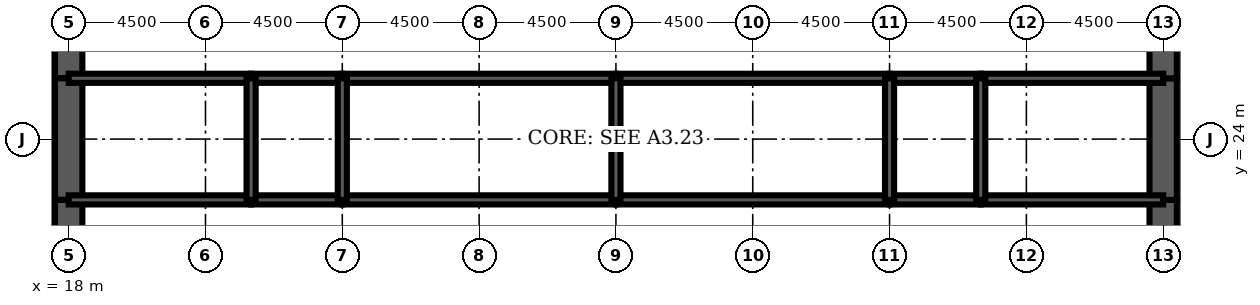
"""IFC4 building model, lengths in metres.
Left out: names, types, materials, properties, quantities, classifications, styles, units other than length and angle.
Written with IfcOpenShell. Run it as: python <this file> out.ifc"""

import sys

from ifc_helpers import new_model, si_unit, direction, frame, frame_2d, origin, place, context, subcontext, project, spatial, rectangle, extrude, element, fill, save


model = new_model("IFC4")
c1 = context("Model", 3, precision=1e-05, world=origin(), true_north=direction((0.0, 1.0)))
c2 = subcontext(c1, "Body", "Model", "MODEL_VIEW")
j1 = project(units=[si_unit("LENGTHUNIT", "METRE"), si_unit("PLANEANGLEUNIT", "RADIAN")], contexts=[c1])
p1 = place(None, origin())
s1 = spatial("IfcSite", under=j1, at=p1, CompositionType="ELEMENT")
p2 = place(p1, origin())
s2 = spatial("IfcBuilding", under=s1, at=p2, CompositionType="ELEMENT")
p3 = place(p2, frame((0.0, 0.0, 100.5)))
s3 = spatial("IfcBuildingStorey", under=s2, at=p3, CompositionType="ELEMENT", Elevation=100.5)
p4 = place(p3, frame((18.0, 28.8, 0.0), z_axis=(0.0, 0.0, 1.0), x_axis=(0.0, -1.0, 0.0)))
e1 = element("IfcWall", 1, at=p4, inside=s3, PredefinedType="SHEAR", context=c2, shape_type="SweptSolid", body=[
    extrude(rectangle(XDim=2.8, YDim=0.9, at=frame_2d((1.4, 0.0))), origin(), (0.0, 0.0, 1.0), 4.2),
])
p5 = place(p4, frame((0.4, 0.0, 0.0)))
e2 = element("IfcOpeningElement", 2, at=p5, cuts=e1, PredefinedType="OPENING", context=c2, shape_type="SweptSolid", body=[
    extrude(rectangle(XDim=1.8, YDim=2.1, at=frame_2d((0.9, 1.05))), frame((0.0, 0.46, 0.0), z_axis=(0.0, -1.0, 0.0), x_axis=(1.0, 0.0, 0.0)), (0.0, 0.0, 1.0), 0.92),
])
p6 = place(p3, frame((18.0, 26.0, 0.0), z_axis=(0.0, 0.0, 1.0), x_axis=(0.0, -1.0, 0.0)))
e3 = element("IfcWall", 3, at=p6, inside=s3, PredefinedType="SHEAR", context=c2, shape_type="SweptSolid", body=[
    extrude(rectangle(XDim=4.0, YDim=0.9, at=frame_2d((2.0, 0.0))), origin(), (0.0, 0.0, 1.0), 4.2),
])
p7 = place(p3, frame((18.0, 22.0, 0.0), z_axis=(0.0, 0.0, 1.0), x_axis=(0.0, -1.0, 0.0)))
e4 = element("IfcWall", 4, at=p7, inside=s3, PredefinedType="SHEAR", context=c2, shape_type="SweptSolid", body=[
    extrude(rectangle(XDim=2.8, YDim=0.9, at=frame_2d((1.4, 0.0))), origin(), (0.0, 0.0, 1.0), 4.2),
])
p8 = place(p7, frame((0.6, 0.0, 0.0)))
e5 = element("IfcOpeningElement", 5, at=p8, cuts=e4, PredefinedType="OPENING", context=c2, shape_type="SweptSolid", body=[
    extrude(rectangle(XDim=1.8, YDim=2.1, at=frame_2d((0.9, 1.05))), frame((0.0, 0.46, 0.0), z_axis=(0.0, -1.0, 0.0), x_axis=(1.0, 0.0, 0.0)), (0.0, 0.0, 1.0), 0.92),
])
p9 = place(p3, frame((54.0, 19.2, 0.0), z_axis=(0.0, 0.0, 1.0), x_axis=(0.0, 1.0, 0.0)))
e6 = element("IfcWall", 6, at=p9, inside=s3, PredefinedType="SHEAR", context=c2, shape_type="SweptSolid", body=[
    extrude(rectangle(XDim=2.8, YDim=0.9, at=frame_2d((1.4, 0.0))), origin(), (0.0, 0.0, 1.0), 4.2),
])
p10 = place(p9, frame((0.4, 0.0, 0.0)))
e7 = element("IfcOpeningElement", 7, at=p10, cuts=e6, PredefinedType="OPENING", context=c2, shape_type="SweptSolid", body=[
    extrude(rectangle(XDim=1.8, YDim=2.1, at=frame_2d((0.9, 1.05))), frame((0.0, 0.46, 0.0), z_axis=(0.0, -1.0, 0.0), x_axis=(1.0, 0.0, 0.0)), (0.0, 0.0, 1.0), 0.92),
])
p11 = place(p3, frame((54.0, 22.0, 0.0), z_axis=(0.0, 0.0, 1.0), x_axis=(0.0, 1.0, 0.0)))
e8 = element("IfcWall", 8, at=p11, inside=s3, PredefinedType="SHEAR", context=c2, shape_type="SweptSolid", body=[
    extrude(rectangle(XDim=4.0, YDim=0.9, at=frame_2d((2.0, 0.0))), origin(), (0.0, 0.0, 1.0), 4.2),
])
p12 = place(p3, frame((54.0, 26.0, 0.0), z_axis=(0.0, 0.0, 1.0), x_axis=(0.0, 1.0, 0.0)))
e9 = element("IfcWall", 9, at=p12, inside=s3, PredefinedType="SHEAR", context=c2, shape_type="SweptSolid", body=[
    extrude(rectangle(XDim=2.8, YDim=0.9, at=frame_2d((1.4, 0.0))), origin(), (0.0, 0.0, 1.0), 4.2),
])
p13 = place(p12, frame((0.6, 0.0, 0.0)))
e10 = element("IfcOpeningElement", 10, at=p13, cuts=e9, PredefinedType="OPENING", context=c2, shape_type="SweptSolid", body=[
    extrude(rectangle(XDim=1.8, YDim=2.1, at=frame_2d((0.9, 1.05))), frame((0.0, 0.46, 0.0), z_axis=(0.0, -1.0, 0.0), x_axis=(1.0, 0.0, 0.0)), (0.0, 0.0, 1.0), 0.92),
])
p14 = place(p3, frame((18.0, 22.0, 0.0), z_axis=(0.0, 0.0, 1.0), x_axis=(1.0, 0.0, 0.0)))
e11 = element("IfcWall", 11, at=p14, inside=s3, PredefinedType="SOLIDWALL", context=c2, shape_type="SweptSolid", body=[
    extrude(rectangle(XDim=6.0, YDim=0.3, at=frame_2d((3.0, 0.0))), origin(), (0.0, 0.0, 1.0), 4.2),
])
p15 = place(p14, frame((2.0, 0.0, 0.0)))
e12 = element("IfcOpeningElement", 12, at=p15, cuts=e11, PredefinedType="OPENING", context=c2, shape_type="SweptSolid", body=[
    extrude(rectangle(XDim=1.0, YDim=2.1, at=frame_2d((0.5, 1.05))), frame((0.0, 0.16, 0.0), z_axis=(0.0, -1.0, 0.0), x_axis=(1.0, 0.0, 0.0)), (0.0, 0.0, 1.0), 0.32),
])
p16 = place(p3, frame((24.0, 22.0, 0.0), z_axis=(0.0, 0.0, 1.0), x_axis=(1.0, 0.0, 0.0)))
e13 = element("IfcWall", 13, at=p16, inside=s3, PredefinedType="SOLIDWALL", context=c2, shape_type="SweptSolid", body=[
    extrude(rectangle(XDim=3.0, YDim=0.3, at=frame_2d((1.5, 0.0))), origin(), (0.0, 0.0, 1.0), 4.2),
])
p17 = place(p16, frame((1.0, 0.0, 0.0)))
e14 = element("IfcOpeningElement", 14, at=p17, cuts=e13, PredefinedType="OPENING", context=c2, shape_type="SweptSolid", body=[
    extrude(rectangle(XDim=1.0, YDim=2.1, at=frame_2d((0.5, 1.05))), frame((0.0, 0.16, 0.0), z_axis=(0.0, -1.0, 0.0), x_axis=(1.0, 0.0, 0.0)), (0.0, 0.0, 1.0), 0.32),
])
p18 = place(p3, frame((27.0, 22.0, 0.0), z_axis=(0.0, 0.0, 1.0), x_axis=(1.0, 0.0, 0.0)))
e15 = element("IfcWall", 15, at=p18, inside=s3, PredefinedType="SOLIDWALL", context=c2, shape_type="SweptSolid", body=[
    extrude(rectangle(XDim=9.0, YDim=0.3, at=frame_2d((4.5, 0.0))), origin(), (0.0, 0.0, 1.0), 4.2),
])
p19 = place(p18, frame((4.0, 0.0, 0.0)))
e16 = element("IfcOpeningElement", 16, at=p19, cuts=e15, PredefinedType="OPENING", context=c2, shape_type="SweptSolid", body=[
    extrude(rectangle(XDim=1.0, YDim=2.1, at=frame_2d((0.5, 1.05))), frame((0.0, 0.16, 0.0), z_axis=(0.0, -1.0, 0.0), x_axis=(1.0, 0.0, 0.0)), (0.0, 0.0, 1.0), 0.32),
])
p20 = place(p3, frame((36.0, 22.0, 0.0), z_axis=(0.0, 0.0, 1.0), x_axis=(1.0, 0.0, 0.0)))
e17 = element("IfcWall", 17, at=p20, inside=s3, PredefinedType="SOLIDWALL", context=c2, shape_type="SweptSolid", body=[
    extrude(rectangle(XDim=9.0, YDim=0.3, at=frame_2d((4.5, 0.0))), origin(), (0.0, 0.0, 1.0), 4.2),
])
p21 = place(p20, frame((4.0, 0.0, 0.0)))
e18 = element("IfcOpeningElement", 18, at=p21, cuts=e17, PredefinedType="OPENING", context=c2, shape_type="SweptSolid", body=[
    extrude(rectangle(XDim=1.0, YDim=2.1, at=frame_2d((0.5, 1.05))), frame((0.0, 0.16, 0.0), z_axis=(0.0, -1.0, 0.0), x_axis=(1.0, 0.0, 0.0)), (0.0, 0.0, 1.0), 0.32),
])
p22 = place(p3, frame((45.0, 22.0, 0.0), z_axis=(0.0, 0.0, 1.0), x_axis=(1.0, 0.0, 0.0)))
e19 = element("IfcWall", 19, at=p22, inside=s3, PredefinedType="SOLIDWALL", context=c2, shape_type="SweptSolid", body=[
    extrude(rectangle(XDim=3.0, YDim=0.3, at=frame_2d((1.5, 0.0))), origin(), (0.0, 0.0, 1.0), 4.2),
])
p23 = place(p22, frame((1.0, 0.0, 0.0)))
e20 = element("IfcOpeningElement", 20, at=p23, cuts=e19, PredefinedType="OPENING", context=c2, shape_type="SweptSolid", body=[
    extrude(rectangle(XDim=1.0, YDim=2.1, at=frame_2d((0.5, 1.05))), frame((0.0, 0.16, 0.0), z_axis=(0.0, -1.0, 0.0), x_axis=(1.0, 0.0, 0.0)), (0.0, 0.0, 1.0), 0.32),
])
p24 = place(p3, frame((48.0, 22.0, 0.0), z_axis=(0.0, 0.0, 1.0), x_axis=(1.0, 0.0, 0.0)))
e21 = element("IfcWall", 21, at=p24, inside=s3, PredefinedType="SOLIDWALL", context=c2, shape_type="SweptSolid", body=[
    extrude(rectangle(XDim=6.0, YDim=0.3, at=frame_2d((3.0, 0.0))), origin(), (0.0, 0.0, 1.0), 4.2),
])
p25 = place(p24, frame((2.0, 0.0, 0.0)))
e22 = element("IfcOpeningElement", 22, at=p25, cuts=e21, PredefinedType="OPENING", context=c2, shape_type="SweptSolid", body=[
    extrude(rectangle(XDim=1.0, YDim=2.1, at=frame_2d((0.5, 1.05))), frame((0.0, 0.16, 0.0), z_axis=(0.0, -1.0, 0.0), x_axis=(1.0, 0.0, 0.0)), (0.0, 0.0, 1.0), 0.32),
])
p26 = place(p24, frame((4.3, 0.0, 0.0)))
e23 = element("IfcOpeningElement", 23, at=p26, cuts=e21, PredefinedType="OPENING", context=c2, shape_type="SweptSolid", body=[
    extrude(rectangle(XDim=1.0, YDim=2.1, at=frame_2d((0.5, 1.05))), frame((0.0, 0.16, 0.0), z_axis=(0.0, -1.0, 0.0), x_axis=(1.0, 0.0, 0.0)), (0.0, 0.0, 1.0), 0.32),
])
p27 = place(p3, frame((18.0, 26.0, 0.0), z_axis=(0.0, 0.0, 1.0), x_axis=(1.0, 0.0, 0.0)))
e24 = element("IfcWall", 24, at=p27, inside=s3, PredefinedType="SOLIDWALL", context=c2, shape_type="SweptSolid", body=[
    extrude(rectangle(XDim=6.0, YDim=0.3, at=frame_2d((3.0, 0.0))), origin(), (0.0, 0.0, 1.0), 4.2),
])
p28 = place(p3, frame((24.0, 26.0, 0.0), z_axis=(0.0, 0.0, 1.0), x_axis=(1.0, 0.0, 0.0)))
e25 = element("IfcWall", 25, at=p28, inside=s3, PredefinedType="SOLIDWALL", context=c2, shape_type="SweptSolid", body=[
    extrude(rectangle(XDim=3.0, YDim=0.3, at=frame_2d((1.5, 0.0))), origin(), (0.0, 0.0, 1.0), 4.2),
])
for number, where, z_axis, x_axis in (
    (26, (27.0, 26.0, 0.0), (0.0, 0.0, 1.0), (1.0, 0.0, 0.0)),
    (27, (36.0, 26.0, 0.0), (0.0, 0.0, 1.0), (1.0, 0.0, 0.0)),
):
    element("IfcWall", number, at=place(p3, frame(where, z_axis=z_axis, x_axis=x_axis)), inside=s3, PredefinedType="SOLIDWALL", context=c2, shape_type="SweptSolid", body=[
        extrude(rectangle(XDim=9.0, YDim=0.3, at=frame_2d((4.5, 0.0))), origin(), (0.0, 0.0, 1.0), 4.2),
    ])
p29 = place(p3, frame((45.0, 26.0, 0.0), z_axis=(0.0, 0.0, 1.0), x_axis=(1.0, 0.0, 0.0)))
e28 = element("IfcWall", 28, at=p29, inside=s3, PredefinedType="SOLIDWALL", context=c2, shape_type="SweptSolid", body=[
    extrude(rectangle(XDim=3.0, YDim=0.3, at=frame_2d((1.5, 0.0))), origin(), (0.0, 0.0, 1.0), 4.2),
])
p30 = place(p3, frame((48.0, 26.0, 0.0), z_axis=(0.0, 0.0, 1.0), x_axis=(1.0, 0.0, 0.0)))
e29 = element("IfcWall", 29, at=p30, inside=s3, PredefinedType="SOLIDWALL", context=c2, shape_type="SweptSolid", body=[
    extrude(rectangle(XDim=6.0, YDim=0.3, at=frame_2d((3.0, 0.0))), origin(), (0.0, 0.0, 1.0), 4.2),
])
for number, where, z_axis, x_axis in (
    (30, (24.0, 22.0, 0.0), (0.0, 0.0, 1.0), (0.0, 1.0, 0.0)),
    (31, (27.0, 22.0, 0.0), (0.0, 0.0, 1.0), (0.0, 1.0, 0.0)),
    (32, (36.0, 22.0, 0.0), (0.0, 0.0, 1.0), (0.0, 1.0, 0.0)),
    (33, (45.0, 22.0, 0.0), (0.0, 0.0, 1.0), (0.0, 1.0, 0.0)),
    (34, (48.0, 22.0, 0.0), (0.0, 0.0, 1.0), (0.0, 1.0, 0.0)),
):
    element("IfcWall", number, at=place(p3, frame(where, z_axis=z_axis, x_axis=x_axis)), inside=s3, PredefinedType="SOLIDWALL", context=c2, shape_type="SweptSolid", body=[
        extrude(rectangle(XDim=4.0, YDim=0.3, at=frame_2d((2.0, 0.0))), origin(), (0.0, 0.0, 1.0), 4.2),
    ])
p31 = place(p3, frame((42.5, 22.15, 0.0), z_axis=(0.0, 0.0, 1.0), x_axis=(0.0, 1.0, 0.0)))
e35 = element("IfcWall", 35, at=p31, inside=s3, PredefinedType="PARTITIONING", context=c2, shape_type="SweptSolid", body=[
    extrude(rectangle(XDim=3.7, YDim=0.15, at=frame_2d((1.85, 0.0))), origin(), (0.0, 0.0, 1.0), 3.0),
])
p32 = place(p31, frame((2.2, 0.0, 0.0)))
e36 = element("IfcOpeningElement", 36, at=p32, cuts=e35, PredefinedType="OPENING", context=c2, shape_type="SweptSolid", body=[
    extrude(rectangle(XDim=1.0, YDim=2.1, at=frame_2d((0.5, 1.05))), frame((0.0, 0.085, 0.0), z_axis=(0.0, -1.0, 0.0), x_axis=(1.0, 0.0, 0.0)), (0.0, 0.0, 1.0), 0.17),
])
p33 = place(p3, frame((51.975, 22.15, 0.0), z_axis=(0.0, 0.0, 1.0), x_axis=(0.0, 1.0, 0.0)))
e37 = element("IfcWall", 37, at=p33, inside=s3, PredefinedType="PARTITIONING", context=c2, shape_type="SweptSolid", body=[
    extrude(rectangle(XDim=3.7, YDim=0.15, at=frame_2d((1.85, 0.0))), origin(), (0.0, 0.0, 1.0), 3.0),
])
p34 = place(p32, origin())
e38 = element("IfcDoor", 38, at=p34, inside=s3, OperationType="SINGLE_SWING_RIGHT", PredefinedType="DOOR", context=c2, shape_type="SweptSolid", body=[
    extrude(rectangle(XDim=1.0, YDim=2.1, at=frame_2d((0.5, 1.05))), frame((0.0, 0.025, 0.0), z_axis=(0.0, -1.0, 0.0), x_axis=(1.0, 0.0, 0.0)), (0.0, 0.0, 1.0), 0.05),
])
fill(e36, e38)
p35 = place(p8, origin())
e39 = element("IfcDoor", 39, at=p35, inside=s3, OperationType="SINGLE_SWING_LEFT", PredefinedType="DOOR", context=c2, shape_type="SweptSolid", body=[
    extrude(rectangle(XDim=1.8, YDim=2.1, at=frame_2d((0.9, 1.05))), frame((0.0, 0.45, 0.0), z_axis=(0.0, -1.0, 0.0), x_axis=(1.0, 0.0, 0.0)), (0.0, 0.0, 1.0), 0.899),
])
fill(e5, e39)
p36 = place(p5, origin())
e40 = element("IfcDoor", 40, at=p36, inside=s3, OperationType="SINGLE_SWING_LEFT", PredefinedType="DOOR", context=c2, shape_type="SweptSolid", body=[
    extrude(rectangle(XDim=1.8, YDim=2.1, at=frame_2d((0.9, 1.05))), frame((0.0, 0.45, 0.0), z_axis=(0.0, -1.0, 0.0), x_axis=(1.0, 0.0, 0.0)), (0.0, 0.0, 1.0), 0.899),
])
fill(e2, e40)
p37 = place(p10, origin())
e41 = element("IfcDoor", 41, at=p37, inside=s3, OperationType="SINGLE_SWING_LEFT", PredefinedType="DOOR", context=c2, shape_type="SweptSolid", body=[
    extrude(rectangle(XDim=1.8, YDim=2.1, at=frame_2d((0.9, 1.05))), frame((0.0, 0.45, 0.0), z_axis=(0.0, -1.0, 0.0), x_axis=(1.0, 0.0, 0.0)), (0.0, 0.0, 1.0), 0.899),
])
fill(e7, e41)
p38 = place(p13, origin())
e42 = element("IfcDoor", 42, at=p38, inside=s3, OperationType="SINGLE_SWING_LEFT", PredefinedType="DOOR", context=c2, shape_type="SweptSolid", body=[
    extrude(rectangle(XDim=1.8, YDim=2.1, at=frame_2d((0.9, 1.05))), frame((0.0, 0.45, 0.0), z_axis=(0.0, -1.0, 0.0), x_axis=(1.0, 0.0, 0.0)), (0.0, 0.0, 1.0), 0.899),
])
fill(e10, e42)
p39 = place(p15, origin())
e43 = element("IfcDoor", 43, at=p39, inside=s3, OperationType="SINGLE_SWING_LEFT", PredefinedType="DOOR", context=c2, shape_type="SweptSolid", body=[
    extrude(rectangle(XDim=1.0, YDim=2.1, at=frame_2d((0.5, 1.05))), frame((0.0, 0.025, 0.0), z_axis=(0.0, -1.0, 0.0), x_axis=(1.0, 0.0, 0.0)), (0.0, 0.0, 1.0), 0.05),
])
fill(e12, e43)
p40 = place(p17, origin())
e44 = element("IfcDoor", 44, at=p40, inside=s3, OperationType="SINGLE_SWING_LEFT", PredefinedType="DOOR", context=c2, shape_type="SweptSolid", body=[
    extrude(rectangle(XDim=1.0, YDim=2.1, at=frame_2d((0.5, 1.05))), frame((0.0, 0.025, 0.0), z_axis=(0.0, -1.0, 0.0), x_axis=(1.0, 0.0, 0.0)), (0.0, 0.0, 1.0), 0.05),
])
fill(e14, e44)
p41 = place(p19, origin())
e45 = element("IfcDoor", 45, at=p41, inside=s3, OperationType="SINGLE_SWING_LEFT", PredefinedType="DOOR", context=c2, shape_type="SweptSolid", body=[
    extrude(rectangle(XDim=1.0, YDim=2.1, at=frame_2d((0.5, 1.05))), frame((0.0, 0.025, 0.0), z_axis=(0.0, -1.0, 0.0), x_axis=(1.0, 0.0, 0.0)), (0.0, 0.0, 1.0), 0.05),
])
fill(e16, e45)
p42 = place(p21, origin())
e46 = element("IfcDoor", 46, at=p42, inside=s3, OperationType="SINGLE_SWING_LEFT", PredefinedType="DOOR", context=c2, shape_type="SweptSolid", body=[
    extrude(rectangle(XDim=1.0, YDim=2.1, at=frame_2d((0.5, 1.05))), frame((0.0, 0.025, 0.0), z_axis=(0.0, -1.0, 0.0), x_axis=(1.0, 0.0, 0.0)), (0.0, 0.0, 1.0), 0.05),
])
fill(e18, e46)
p43 = place(p23, origin())
e47 = element("IfcDoor", 47, at=p43, inside=s3, OperationType="SINGLE_SWING_LEFT", PredefinedType="DOOR", context=c2, shape_type="SweptSolid", body=[
    extrude(rectangle(XDim=1.0, YDim=2.1, at=frame_2d((0.5, 1.05))), frame((0.0, 0.025, 0.0), z_axis=(0.0, -1.0, 0.0), x_axis=(1.0, 0.0, 0.0)), (0.0, 0.0, 1.0), 0.05),
])
fill(e20, e47)
p44 = place(p25, origin())
e48 = element("IfcDoor", 48, at=p44, inside=s3, OperationType="SINGLE_SWING_LEFT", PredefinedType="DOOR", context=c2, shape_type="SweptSolid", body=[
    extrude(rectangle(XDim=1.0, YDim=2.1, at=frame_2d((0.5, 1.05))), frame((0.0, 0.025, 0.0), z_axis=(0.0, -1.0, 0.0), x_axis=(1.0, 0.0, 0.0)), (0.0, 0.0, 1.0), 0.05),
])
fill(e22, e48)
p45 = place(p26, origin())
e49 = element("IfcDoor", 49, at=p45, inside=s3, OperationType="SINGLE_SWING_RIGHT", PredefinedType="DOOR", context=c2, shape_type="SweptSolid", body=[
    extrude(rectangle(XDim=1.0, YDim=2.1, at=frame_2d((0.5, 1.05))), frame((0.0, 0.025, 0.0), z_axis=(0.0, -1.0, 0.0), x_axis=(1.0, 0.0, 0.0)), (0.0, 0.0, 1.0), 0.05),
])
fill(e23, e49)
save(model, sys.argv[1])
